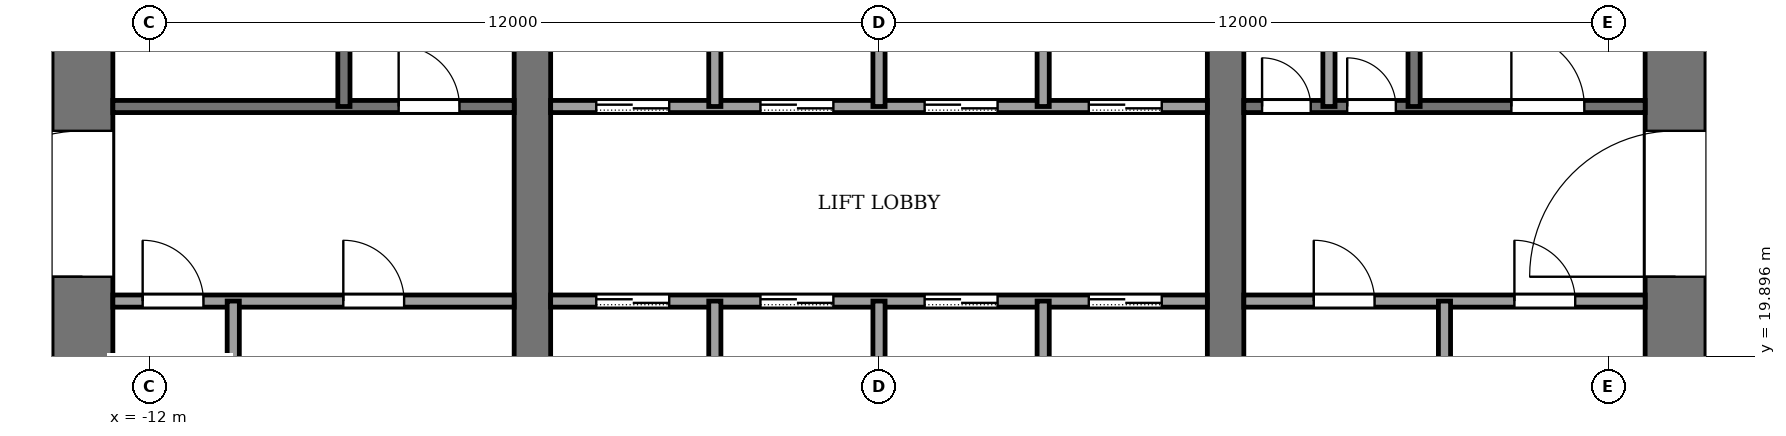
"""IFC4 building model, lengths in metres.
Left out: names, types, materials, properties, quantities, classifications, styles, units other than length and angle.
Written with IfcOpenShell. Run it as: python <this file> out.ifc"""

import sys

from ifc_helpers import new_model, si_unit, direction, frame, frame_2d, origin, place, context, subcontext, project, spatial, rectangle, extrude, element, fill, save


model = new_model("IFC4")
c1 = context("Model", 3, precision=1e-05, world=origin(), true_north=direction((0.0, 1.0)))
c2 = subcontext(c1, "Body", "Model", "MODEL_VIEW")
j1 = project(units=[si_unit("LENGTHUNIT", "METRE"), si_unit("PLANEANGLEUNIT", "RADIAN")], contexts=[c1])
p1 = place(None, origin())
s1 = spatial("IfcSite", under=j1, at=p1, CompositionType="ELEMENT")
p2 = place(p1, origin())
s2 = spatial("IfcBuilding", under=s1, at=p2, CompositionType="ELEMENT")
p3 = place(p2, frame((0.0, 0.0, 138.0)))
s3 = spatial("IfcBuildingStorey", under=s2, at=p3, CompositionType="ELEMENT", Elevation=138.0)
p4 = place(p3, frame((-13.1, 18.4, -0.13), z_axis=(0.0, 0.0, 1.0), x_axis=(0.0, 1.0, 0.0)))
e1 = element("IfcWall", 1, at=p4, inside=s3, PredefinedType="SHEAR", context=c2, shape_type="SweptSolid", body=[
    extrude(rectangle(XDim=19.2, YDim=1.0, at=frame_2d((9.6, 0.0))), origin(), (0.0, 0.0, 1.0), 4.0),
])
p5 = place(p4, frame((2.8, 0.0, 0.13)))
e2 = element("IfcOpeningElement", 2, at=p5, cuts=e1, PredefinedType="OPENING", context=c2, shape_type="SweptSolid", body=[
    extrude(rectangle(XDim=2.4, YDim=2.4, at=frame_2d((1.2, 1.2))), frame((0.0, 0.51, 0.0), z_axis=(0.0, -1.0, 0.0), x_axis=(1.0, 0.0, 0.0)), (0.0, 0.0, 1.0), 1.02),
])
p6 = place(p4, frame((13.4, 0.0, 0.13)))
e3 = element("IfcOpeningElement", 3, at=p6, cuts=e1, PredefinedType="OPENING", context=c2, shape_type="SweptSolid", body=[
    extrude(rectangle(XDim=1.4, YDim=2.2, at=frame_2d((0.7, 1.1))), frame((0.0, 0.51, 0.0), z_axis=(0.0, -1.0, 0.0), x_axis=(1.0, 0.0, 0.0)), (0.0, 0.0, 1.0), 1.02),
])
p7 = place(p3, frame((13.1, 18.4, -0.13), z_axis=(0.0, 0.0, 1.0), x_axis=(0.0, 1.0, 0.0)))
e4 = element("IfcWall", 4, at=p7, inside=s3, PredefinedType="SHEAR", context=c2, shape_type="SweptSolid", body=[
    extrude(rectangle(XDim=19.2, YDim=1.0, at=frame_2d((9.6, 0.0))), origin(), (0.0, 0.0, 1.0), 4.0),
])
p8 = place(p7, frame((2.8, 0.0, 0.13)))
e5 = element("IfcOpeningElement", 5, at=p8, cuts=e4, PredefinedType="OPENING", context=c2, shape_type="SweptSolid", body=[
    extrude(rectangle(XDim=2.4, YDim=2.4, at=frame_2d((1.2, 1.2))), frame((0.0, 0.51, 0.0), z_axis=(0.0, -1.0, 0.0), x_axis=(1.0, 0.0, 0.0)), (0.0, 0.0, 1.0), 1.02),
])
p9 = place(p7, frame((13.3, 0.0, 0.13)))
e6 = element("IfcOpeningElement", 6, at=p9, cuts=e4, PredefinedType="OPENING", context=c2, shape_type="SweptSolid", body=[
    extrude(rectangle(XDim=2.4, YDim=2.4, at=frame_2d((1.2, 1.2))), frame((0.0, 0.51, 0.0), z_axis=(0.0, -1.0, 0.0), x_axis=(1.0, 0.0, 0.0)), (0.0, 0.0, 1.0), 1.02),
])
p10 = place(p3, frame((-5.7, 18.4, -0.13), z_axis=(0.0, 0.0, 1.0), x_axis=(0.0, 1.0, 0.0)))
e7 = element("IfcWall", 7, at=p10, inside=s3, PredefinedType="SHEAR", context=c2, shape_type="SweptSolid", body=[
    extrude(rectangle(XDim=19.2, YDim=0.6, at=frame_2d((9.6, 0.0))), origin(), (0.0, 0.0, 1.0), 4.0),
])
p11 = place(p10, frame((8.35, 0.0, 0.13)))
e8 = element("IfcOpeningElement", 8, at=p11, cuts=e7, PredefinedType="OPENING", context=c2, shape_type="SweptSolid", body=[
    extrude(rectangle(XDim=0.9, YDim=2.1, at=frame_2d((0.45, 1.05))), frame((0.0, 0.31, 0.0), z_axis=(0.0, -1.0, 0.0), x_axis=(1.0, 0.0, 0.0)), (0.0, 0.0, 1.0), 0.62),
])
p12 = place(p3, frame((5.7, 18.4, -0.13), z_axis=(0.0, 0.0, 1.0), x_axis=(0.0, 1.0, 0.0)))
e9 = element("IfcWall", 9, at=p12, inside=s3, PredefinedType="SHEAR", context=c2, shape_type="SweptSolid", body=[
    extrude(rectangle(XDim=19.2, YDim=0.6, at=frame_2d((9.6, 0.0))), origin(), (0.0, 0.0, 1.0), 4.0),
])
p13 = place(p12, frame((13.3, 0.0, 0.13)))
e10 = element("IfcOpeningElement", 10, at=p13, cuts=e9, PredefinedType="OPENING", context=c2, shape_type="SweptSolid", body=[
    extrude(rectangle(XDim=2.4, YDim=2.4, at=frame_2d((1.2, 1.2))), frame((0.0, 0.31, 0.0), z_axis=(0.0, -1.0, 0.0), x_axis=(1.0, 0.0, 0.0)), (0.0, 0.0, 1.0), 0.62),
])
p14 = place(p3, frame((-12.6, 20.8, 0.0), z_axis=(0.0, 0.0, 1.0), x_axis=(1.0, 0.0, 0.0)))
e11 = element("IfcWall", 11, at=p14, inside=s3, PredefinedType="PARTITIONING", context=c2, shape_type="SweptSolid", body=[
    extrude(rectangle(XDim=6.6, YDim=0.2, at=frame_2d((3.3, 0.0))), origin(), (0.0, 0.0, 1.0), 3.87),
])
p15 = place(p14, frame((0.49, 0.0, 0.0)))
e12 = element("IfcOpeningElement", 12, at=p15, cuts=e11, PredefinedType="OPENING", context=c2, shape_type="SweptSolid", body=[
    extrude(rectangle(XDim=1.0, YDim=2.1, at=frame_2d((0.5, 1.05))), frame((0.0, 0.11, 0.0), z_axis=(0.0, -1.0, 0.0), x_axis=(1.0, 0.0, 0.0)), (0.0, 0.0, 1.0), 0.22),
])
p16 = place(p14, frame((3.79, 0.0, 0.0)))
e13 = element("IfcOpeningElement", 13, at=p16, cuts=e11, PredefinedType="OPENING", context=c2, shape_type="SweptSolid", body=[
    extrude(rectangle(XDim=1.0, YDim=2.1, at=frame_2d((0.5, 1.05))), frame((0.0, 0.11, 0.0), z_axis=(0.0, -1.0, 0.0), x_axis=(1.0, 0.0, 0.0)), (0.0, 0.0, 1.0), 0.22),
])
p17 = place(p3, frame((-5.4, 20.8, 0.0), z_axis=(0.0, 0.0, 1.0), x_axis=(1.0, 0.0, 0.0)))
e14 = element("IfcWall", 14, at=p17, inside=s3, PredefinedType="PARTITIONING", context=c2, shape_type="SweptSolid", body=[
    extrude(rectangle(XDim=10.8, YDim=0.2, at=frame_2d((5.4, 0.0))), origin(), (0.0, 0.0, 1.0), 3.87),
])
p18 = place(p17, frame((0.75, 0.0, 0.0)))
e15 = element("IfcOpeningElement", 15, at=p18, cuts=e14, PredefinedType="OPENING", context=c2, shape_type="SweptSolid", body=[
    extrude(rectangle(XDim=1.2, YDim=2.2, at=frame_2d((0.6, 1.1))), frame((0.0, 0.11, 0.0), z_axis=(0.0, -1.0, 0.0), x_axis=(1.0, 0.0, 0.0)), (0.0, 0.0, 1.0), 0.22),
])
p19 = place(p17, frame((3.45, 0.0, 0.0)))
e16 = element("IfcOpeningElement", 16, at=p19, cuts=e14, PredefinedType="OPENING", context=c2, shape_type="SweptSolid", body=[
    extrude(rectangle(XDim=1.2, YDim=2.2, at=frame_2d((0.6, 1.1))), frame((0.0, 0.11, 0.0), z_axis=(0.0, -1.0, 0.0), x_axis=(1.0, 0.0, 0.0)), (0.0, 0.0, 1.0), 0.22),
])
p20 = place(p17, frame((6.15, 0.0, 0.0)))
e17 = element("IfcOpeningElement", 17, at=p20, cuts=e14, PredefinedType="OPENING", context=c2, shape_type="SweptSolid", body=[
    extrude(rectangle(XDim=1.2, YDim=2.2, at=frame_2d((0.6, 1.1))), frame((0.0, 0.11, 0.0), z_axis=(0.0, -1.0, 0.0), x_axis=(1.0, 0.0, 0.0)), (0.0, 0.0, 1.0), 0.22),
])
p21 = place(p17, frame((8.85, 0.0, 0.0)))
e18 = element("IfcOpeningElement", 18, at=p21, cuts=e14, PredefinedType="OPENING", context=c2, shape_type="SweptSolid", body=[
    extrude(rectangle(XDim=1.2, YDim=2.2, at=frame_2d((0.6, 1.1))), frame((0.0, 0.11, 0.0), z_axis=(0.0, -1.0, 0.0), x_axis=(1.0, 0.0, 0.0)), (0.0, 0.0, 1.0), 0.22),
])
p22 = place(p3, frame((6.0, 20.8, 0.0), z_axis=(0.0, 0.0, 1.0), x_axis=(1.0, 0.0, 0.0)))
e19 = element("IfcWall", 19, at=p22, inside=s3, PredefinedType="PARTITIONING", context=c2, shape_type="SweptSolid", body=[
    extrude(rectangle(XDim=6.6, YDim=0.2, at=frame_2d((3.3, 0.0))), origin(), (0.0, 0.0, 1.0), 3.87),
])
p23 = place(p22, frame((1.15, 0.0, 0.0)))
e20 = element("IfcOpeningElement", 20, at=p23, cuts=e19, PredefinedType="OPENING", context=c2, shape_type="SweptSolid", body=[
    extrude(rectangle(XDim=1.0, YDim=2.1, at=frame_2d((0.5, 1.05))), frame((0.0, 0.11, 0.0), z_axis=(0.0, -1.0, 0.0), x_axis=(1.0, 0.0, 0.0)), (0.0, 0.0, 1.0), 0.22),
])
p24 = place(p22, frame((4.45, 0.0, 0.0)))
e21 = element("IfcOpeningElement", 21, at=p24, cuts=e19, PredefinedType="OPENING", context=c2, shape_type="SweptSolid", body=[
    extrude(rectangle(XDim=1.0, YDim=2.1, at=frame_2d((0.5, 1.05))), frame((0.0, 0.11, 0.0), z_axis=(0.0, -1.0, 0.0), x_axis=(1.0, 0.0, 0.0)), (0.0, 0.0, 1.0), 0.22),
])
p25 = place(p3, frame((-12.6, 24.0, 0.0), z_axis=(0.0, 0.0, 1.0), x_axis=(1.0, 0.0, 0.0)))
e22 = element("IfcWall", 22, at=p25, inside=s3, PredefinedType="PARTITIONING", context=c2, shape_type="SweptSolid", body=[
    extrude(rectangle(XDim=6.6, YDim=0.2, at=frame_2d((3.3, 0.0))), origin(), (0.0, 0.0, 1.0), 3.87),
])
p26 = place(p25, frame((4.7, 0.0, 0.0)))
e23 = element("IfcOpeningElement", 23, at=p26, cuts=e22, PredefinedType="OPENING", context=c2, shape_type="SweptSolid", body=[
    extrude(rectangle(XDim=1.0, YDim=2.1, at=frame_2d((0.5, 1.05))), frame((0.0, 0.11, 0.0), z_axis=(0.0, -1.0, 0.0), x_axis=(1.0, 0.0, 0.0)), (0.0, 0.0, 1.0), 0.22),
])
p27 = place(p3, frame((-5.4, 24.0, 0.0), z_axis=(0.0, 0.0, 1.0), x_axis=(1.0, 0.0, 0.0)))
e24 = element("IfcWall", 24, at=p27, inside=s3, PredefinedType="PARTITIONING", context=c2, shape_type="SweptSolid", body=[
    extrude(rectangle(XDim=10.8, YDim=0.2, at=frame_2d((5.4, 0.0))), origin(), (0.0, 0.0, 1.0), 3.87),
])
p28 = place(p27, frame((0.75, 0.0, 0.0)))
e25 = element("IfcOpeningElement", 25, at=p28, cuts=e24, PredefinedType="OPENING", context=c2, shape_type="SweptSolid", body=[
    extrude(rectangle(XDim=1.2, YDim=2.2, at=frame_2d((0.6, 1.1))), frame((0.0, 0.11, 0.0), z_axis=(0.0, -1.0, 0.0), x_axis=(1.0, 0.0, 0.0)), (0.0, 0.0, 1.0), 0.22),
])
p29 = place(p27, frame((3.45, 0.0, 0.0)))
e26 = element("IfcOpeningElement", 26, at=p29, cuts=e24, PredefinedType="OPENING", context=c2, shape_type="SweptSolid", body=[
    extrude(rectangle(XDim=1.2, YDim=2.2, at=frame_2d((0.6, 1.1))), frame((0.0, 0.11, 0.0), z_axis=(0.0, -1.0, 0.0), x_axis=(1.0, 0.0, 0.0)), (0.0, 0.0, 1.0), 0.22),
])
p30 = place(p27, frame((6.15, 0.0, 0.0)))
e27 = element("IfcOpeningElement", 27, at=p30, cuts=e24, PredefinedType="OPENING", context=c2, shape_type="SweptSolid", body=[
    extrude(rectangle(XDim=1.2, YDim=2.2, at=frame_2d((0.6, 1.1))), frame((0.0, 0.11, 0.0), z_axis=(0.0, -1.0, 0.0), x_axis=(1.0, 0.0, 0.0)), (0.0, 0.0, 1.0), 0.22),
])
p31 = place(p27, frame((8.85, 0.0, 0.0)))
e28 = element("IfcOpeningElement", 28, at=p31, cuts=e24, PredefinedType="OPENING", context=c2, shape_type="SweptSolid", body=[
    extrude(rectangle(XDim=1.2, YDim=2.2, at=frame_2d((0.6, 1.1))), frame((0.0, 0.11, 0.0), z_axis=(0.0, -1.0, 0.0), x_axis=(1.0, 0.0, 0.0)), (0.0, 0.0, 1.0), 0.22),
])
p32 = place(p3, frame((6.0, 24.0, 0.0), z_axis=(0.0, 0.0, 1.0), x_axis=(1.0, 0.0, 0.0)))
e29 = element("IfcWall", 29, at=p32, inside=s3, PredefinedType="PARTITIONING", context=c2, shape_type="SweptSolid", body=[
    extrude(rectangle(XDim=6.6, YDim=0.2, at=frame_2d((3.3, 0.0))), origin(), (0.0, 0.0, 1.0), 3.87),
])
p33 = place(p32, frame((0.3, 0.0, 0.0)))
e30 = element("IfcOpeningElement", 30, at=p33, cuts=e29, PredefinedType="OPENING", context=c2, shape_type="SweptSolid", body=[
    extrude(rectangle(XDim=0.8, YDim=2.1, at=frame_2d((0.4, 1.05))), frame((0.0, 0.11, 0.0), z_axis=(0.0, -1.0, 0.0), x_axis=(1.0, 0.0, 0.0)), (0.0, 0.0, 1.0), 0.22),
])
p34 = place(p32, frame((1.7, 0.0, 0.0)))
e31 = element("IfcOpeningElement", 31, at=p34, cuts=e29, PredefinedType="OPENING", context=c2, shape_type="SweptSolid", body=[
    extrude(rectangle(XDim=0.8, YDim=2.1, at=frame_2d((0.4, 1.05))), frame((0.0, 0.11, 0.0), z_axis=(0.0, -1.0, 0.0), x_axis=(1.0, 0.0, 0.0)), (0.0, 0.0, 1.0), 0.22),
])
p35 = place(p32, frame((4.4, 0.0, 0.0)))
e32 = element("IfcOpeningElement", 32, at=p35, cuts=e29, PredefinedType="OPENING", context=c2, shape_type="SweptSolid", body=[
    extrude(rectangle(XDim=1.2, YDim=2.2, at=frame_2d((0.6, 1.1))), frame((0.0, 0.11, 0.0), z_axis=(0.0, -1.0, 0.0), x_axis=(1.0, 0.0, 0.0)), (0.0, 0.0, 1.0), 0.22),
])
p36 = place(p3, frame((-10.62, 18.4, 0.0), z_axis=(0.0, 0.0, 1.0), x_axis=(0.0, 1.0, 0.0)))
e33 = element("IfcWall", 33, at=p36, inside=s3, PredefinedType="PARTITIONING", context=c2, shape_type="SweptSolid", body=[
    extrude(rectangle(XDim=2.4, YDim=0.2, at=frame_2d((1.2, 0.0))), origin(), (0.0, 0.0, 1.0), 3.87),
])
p37 = place(p3, frame((-8.8, 24.0, 0.0), z_axis=(0.0, 0.0, 1.0), x_axis=(0.0, 1.0, 0.0)))
e34 = element("IfcWall", 34, at=p37, inside=s3, PredefinedType="PARTITIONING", context=c2, shape_type="SweptSolid", body=[
    extrude(rectangle(XDim=7.4, YDim=0.2, at=frame_2d((3.7, 0.0))), origin(), (0.0, 0.0, 1.0), 3.87),
])
p38 = place(p3, frame((-2.7, 18.4, 0.0), z_axis=(0.0, 0.0, 1.0), x_axis=(0.0, 1.0, 0.0)))
e35 = element("IfcWall", 35, at=p38, inside=s3, PredefinedType="PARTITIONING", context=c2, shape_type="SweptSolid", body=[
    extrude(rectangle(XDim=2.4, YDim=0.2, at=frame_2d((1.2, 0.0))), origin(), (0.0, 0.0, 1.0), 3.87),
])
p39 = place(p3, frame((-2.7, 24.0, 0.0), z_axis=(0.0, 0.0, 1.0), x_axis=(0.0, 1.0, 0.0)))
e36 = element("IfcWall", 36, at=p39, inside=s3, PredefinedType="PARTITIONING", context=c2, shape_type="SweptSolid", body=[
    extrude(rectangle(XDim=2.4, YDim=0.2, at=frame_2d((1.2, 0.0))), origin(), (0.0, 0.0, 1.0), 3.87),
])
p40 = place(p3, frame((0.0, 18.4, 0.0), z_axis=(0.0, 0.0, 1.0), x_axis=(0.0, 1.0, 0.0)))
e37 = element("IfcWall", 37, at=p40, inside=s3, PredefinedType="PARTITIONING", context=c2, shape_type="SweptSolid", body=[
    extrude(rectangle(XDim=2.4, YDim=0.2, at=frame_2d((1.2, 0.0))), origin(), (0.0, 0.0, 1.0), 3.87),
])
p41 = place(p3, frame((0.0, 24.0, 0.0), z_axis=(0.0, 0.0, 1.0), x_axis=(0.0, 1.0, 0.0)))
e38 = element("IfcWall", 38, at=p41, inside=s3, PredefinedType="PARTITIONING", context=c2, shape_type="SweptSolid", body=[
    extrude(rectangle(XDim=2.4, YDim=0.2, at=frame_2d((1.2, 0.0))), origin(), (0.0, 0.0, 1.0), 3.87),
])
p42 = place(p3, frame((2.7, 18.4, 0.0), z_axis=(0.0, 0.0, 1.0), x_axis=(0.0, 1.0, 0.0)))
e39 = element("IfcWall", 39, at=p42, inside=s3, PredefinedType="PARTITIONING", context=c2, shape_type="SweptSolid", body=[
    extrude(rectangle(XDim=2.4, YDim=0.2, at=frame_2d((1.2, 0.0))), origin(), (0.0, 0.0, 1.0), 3.87),
])
p43 = place(p3, frame((2.7, 24.0, 0.0), z_axis=(0.0, 0.0, 1.0), x_axis=(0.0, 1.0, 0.0)))
e40 = element("IfcWall", 40, at=p43, inside=s3, PredefinedType="PARTITIONING", context=c2, shape_type="SweptSolid", body=[
    extrude(rectangle(XDim=2.4, YDim=0.2, at=frame_2d((1.2, 0.0))), origin(), (0.0, 0.0, 1.0), 3.87),
])
for number, where, z_axis, x_axis in (
    (41, (7.4, 24.0, 0.0), (0.0, 0.0, 1.0), (0.0, 1.0, 0.0)),
    (42, (8.8, 24.0, 0.0), (0.0, 0.0, 1.0), (0.0, 1.0, 0.0)),
):
    element("IfcWall", number, at=place(p3, frame(where, z_axis=z_axis, x_axis=x_axis)), inside=s3, PredefinedType="PARTITIONING", context=c2, shape_type="SweptSolid", body=[
        extrude(rectangle(XDim=7.4, YDim=0.2, at=frame_2d((3.7, 0.0))), origin(), (0.0, 0.0, 1.0), 3.87),
    ])
p44 = place(p3, frame((9.3, 18.4, 0.0), z_axis=(0.0, 0.0, 1.0), x_axis=(0.0, 1.0, 0.0)))
e43 = element("IfcWall", 43, at=p44, inside=s3, PredefinedType="PARTITIONING", context=c2, shape_type="SweptSolid", body=[
    extrude(rectangle(XDim=2.4, YDim=0.2, at=frame_2d((1.2, 0.0))), origin(), (0.0, 0.0, 1.0), 3.87),
])
p45 = place(p18, origin())
e44 = element("IfcDoor", 44, at=p45, inside=s3, OperationType="SLIDING_TO_LEFT", PredefinedType="DOOR", context=c2, shape_type="SweptSolid", body=[
    extrude(rectangle(XDim=1.2, YDim=2.2, at=frame_2d((0.6, 1.1))), frame((0.0, 0.025, 0.0), z_axis=(0.0, -1.0, 0.0), x_axis=(1.0, 0.0, 0.0)), (0.0, 0.0, 1.0), 0.05),
])
fill(e15, e44)
p46 = place(p19, origin())
e45 = element("IfcDoor", 45, at=p46, inside=s3, OperationType="SLIDING_TO_LEFT", PredefinedType="DOOR", context=c2, shape_type="SweptSolid", body=[
    extrude(rectangle(XDim=1.2, YDim=2.2, at=frame_2d((0.6, 1.1))), frame((0.0, 0.025, 0.0), z_axis=(0.0, -1.0, 0.0), x_axis=(1.0, 0.0, 0.0)), (0.0, 0.0, 1.0), 0.05),
])
fill(e16, e45)
p47 = place(p20, origin())
e46 = element("IfcDoor", 46, at=p47, inside=s3, OperationType="SLIDING_TO_LEFT", PredefinedType="DOOR", context=c2, shape_type="SweptSolid", body=[
    extrude(rectangle(XDim=1.2, YDim=2.2, at=frame_2d((0.6, 1.1))), frame((0.0, 0.025, 0.0), z_axis=(0.0, -1.0, 0.0), x_axis=(1.0, 0.0, 0.0)), (0.0, 0.0, 1.0), 0.05),
])
fill(e17, e46)
p48 = place(p21, origin())
e47 = element("IfcDoor", 47, at=p48, inside=s3, OperationType="SLIDING_TO_LEFT", PredefinedType="DOOR", context=c2, shape_type="SweptSolid", body=[
    extrude(rectangle(XDim=1.2, YDim=2.2, at=frame_2d((0.6, 1.1))), frame((0.0, 0.025, 0.0), z_axis=(0.0, -1.0, 0.0), x_axis=(1.0, 0.0, 0.0)), (0.0, 0.0, 1.0), 0.05),
])
fill(e18, e47)
p49 = place(p28, origin())
e48 = element("IfcDoor", 48, at=p49, inside=s3, OperationType="SLIDING_TO_LEFT", PredefinedType="DOOR", context=c2, shape_type="SweptSolid", body=[
    extrude(rectangle(XDim=1.2, YDim=2.2, at=frame_2d((0.6, 1.1))), frame((0.0, 0.025, 0.0), z_axis=(0.0, -1.0, 0.0), x_axis=(1.0, 0.0, 0.0)), (0.0, 0.0, 1.0), 0.05),
])
fill(e25, e48)
p50 = place(p29, origin())
e49 = element("IfcDoor", 49, at=p50, inside=s3, OperationType="SLIDING_TO_LEFT", PredefinedType="DOOR", context=c2, shape_type="SweptSolid", body=[
    extrude(rectangle(XDim=1.2, YDim=2.2, at=frame_2d((0.6, 1.1))), frame((0.0, 0.025, 0.0), z_axis=(0.0, -1.0, 0.0), x_axis=(1.0, 0.0, 0.0)), (0.0, 0.0, 1.0), 0.05),
])
fill(e26, e49)
p51 = place(p30, origin())
e50 = element("IfcDoor", 50, at=p51, inside=s3, OperationType="SLIDING_TO_LEFT", PredefinedType="DOOR", context=c2, shape_type="SweptSolid", body=[
    extrude(rectangle(XDim=1.2, YDim=2.2, at=frame_2d((0.6, 1.1))), frame((0.0, 0.025, 0.0), z_axis=(0.0, -1.0, 0.0), x_axis=(1.0, 0.0, 0.0)), (0.0, 0.0, 1.0), 0.05),
])
fill(e27, e50)
p52 = place(p31, origin())
e51 = element("IfcDoor", 51, at=p52, inside=s3, OperationType="SLIDING_TO_LEFT", PredefinedType="DOOR", context=c2, shape_type="SweptSolid", body=[
    extrude(rectangle(XDim=1.2, YDim=2.2, at=frame_2d((0.6, 1.1))), frame((0.0, 0.025, 0.0), z_axis=(0.0, -1.0, 0.0), x_axis=(1.0, 0.0, 0.0)), (0.0, 0.0, 1.0), 0.05),
])
fill(e28, e51)
p53 = place(p15, origin())
e52 = element("IfcDoor", 52, at=p53, inside=s3, OperationType="SINGLE_SWING_RIGHT", PredefinedType="DOOR", context=c2, shape_type="SweptSolid", body=[
    extrude(rectangle(XDim=1.0, YDim=2.1, at=frame_2d((0.5, 1.05))), frame((0.0, 0.025, 0.0), z_axis=(0.0, -1.0, 0.0), x_axis=(1.0, 0.0, 0.0)), (0.0, 0.0, 1.0), 0.05),
])
fill(e12, e52)
p54 = place(p16, origin())
e53 = element("IfcDoor", 53, at=p54, inside=s3, OperationType="SINGLE_SWING_RIGHT", PredefinedType="DOOR", context=c2, shape_type="SweptSolid", body=[
    extrude(rectangle(XDim=1.0, YDim=2.1, at=frame_2d((0.5, 1.05))), frame((0.0, 0.025, 0.0), z_axis=(0.0, -1.0, 0.0), x_axis=(1.0, 0.0, 0.0)), (0.0, 0.0, 1.0), 0.05),
])
fill(e13, e53)
p55 = place(p23, origin())
e54 = element("IfcDoor", 54, at=p55, inside=s3, OperationType="SINGLE_SWING_LEFT", PredefinedType="DOOR", context=c2, shape_type="SweptSolid", body=[
    extrude(rectangle(XDim=1.0, YDim=2.1, at=frame_2d((0.5, 1.05))), frame((0.0, 0.025, 0.0), z_axis=(0.0, -1.0, 0.0), x_axis=(1.0, 0.0, 0.0)), (0.0, 0.0, 1.0), 0.05),
])
fill(e20, e54)
p56 = place(p24, origin())
e55 = element("IfcDoor", 55, at=p56, inside=s3, OperationType="SINGLE_SWING_LEFT", PredefinedType="DOOR", context=c2, shape_type="SweptSolid", body=[
    extrude(rectangle(XDim=1.0, YDim=2.1, at=frame_2d((0.5, 1.05))), frame((0.0, 0.025, 0.0), z_axis=(0.0, -1.0, 0.0), x_axis=(1.0, 0.0, 0.0)), (0.0, 0.0, 1.0), 0.05),
])
fill(e21, e55)
p57 = place(p26, origin())
e56 = element("IfcDoor", 56, at=p57, inside=s3, OperationType="SINGLE_SWING_RIGHT", PredefinedType="DOOR", context=c2, shape_type="SweptSolid", body=[
    extrude(rectangle(XDim=1.0, YDim=2.1, at=frame_2d((0.5, 1.05))), frame((0.0, 0.025, 0.0), z_axis=(0.0, -1.0, 0.0), x_axis=(1.0, 0.0, 0.0)), (0.0, 0.0, 1.0), 0.05),
])
fill(e23, e56)
p58 = place(p33, origin())
e57 = element("IfcDoor", 57, at=p58, inside=s3, OperationType="SINGLE_SWING_RIGHT", PredefinedType="DOOR", context=c2, shape_type="SweptSolid", body=[
    extrude(rectangle(XDim=0.8, YDim=2.1, at=frame_2d((0.4, 1.05))), frame((0.0, 0.025, 0.0), z_axis=(0.0, -1.0, 0.0), x_axis=(1.0, 0.0, 0.0)), (0.0, 0.0, 1.0), 0.05),
])
fill(e30, e57)
p59 = place(p34, origin())
e58 = element("IfcDoor", 58, at=p59, inside=s3, OperationType="SINGLE_SWING_LEFT", PredefinedType="DOOR", context=c2, shape_type="SweptSolid", body=[
    extrude(rectangle(XDim=0.8, YDim=2.1, at=frame_2d((0.4, 1.05))), frame((0.0, 0.025, 0.0), z_axis=(0.0, -1.0, 0.0), x_axis=(1.0, 0.0, 0.0)), (0.0, 0.0, 1.0), 0.05),
])
fill(e31, e58)
p60 = place(p35, origin())
e59 = element("IfcDoor", 59, at=p60, inside=s3, OperationType="SINGLE_SWING_RIGHT", PredefinedType="DOOR", context=c2, shape_type="SweptSolid", body=[
    extrude(rectangle(XDim=1.2, YDim=2.2, at=frame_2d((0.6, 1.1))), frame((0.0, 0.025, 0.0), z_axis=(0.0, -1.0, 0.0), x_axis=(1.0, 0.0, 0.0)), (0.0, 0.0, 1.0), 0.05),
])
fill(e32, e59)
p61 = place(p5, origin())
e60 = element("IfcDoor", 60, at=p61, inside=s3, OperationType="DOUBLE_DOOR_SINGLE_SWING", PredefinedType="DOOR", context=c2, shape_type="SweptSolid", body=[
    extrude(rectangle(XDim=2.4, YDim=2.4, at=frame_2d((1.2, 1.2))), frame((0.0, 0.025, 0.0), z_axis=(0.0, -1.0, 0.0), x_axis=(1.0, 0.0, 0.0)), (0.0, 0.0, 1.0), 0.05),
])
fill(e2, e60)
p62 = place(p8, origin())
e61 = element("IfcDoor", 61, at=p62, inside=s3, OperationType="DOUBLE_DOOR_SINGLE_SWING", PredefinedType="DOOR", context=c2, shape_type="SweptSolid", body=[
    extrude(rectangle(XDim=2.4, YDim=2.4, at=frame_2d((1.2, 1.2))), frame((0.0, 0.025, 0.0), z_axis=(0.0, -1.0, 0.0), x_axis=(1.0, 0.0, 0.0)), (0.0, 0.0, 1.0), 0.05),
])
fill(e5, e61)
save(model, sys.argv[1])
